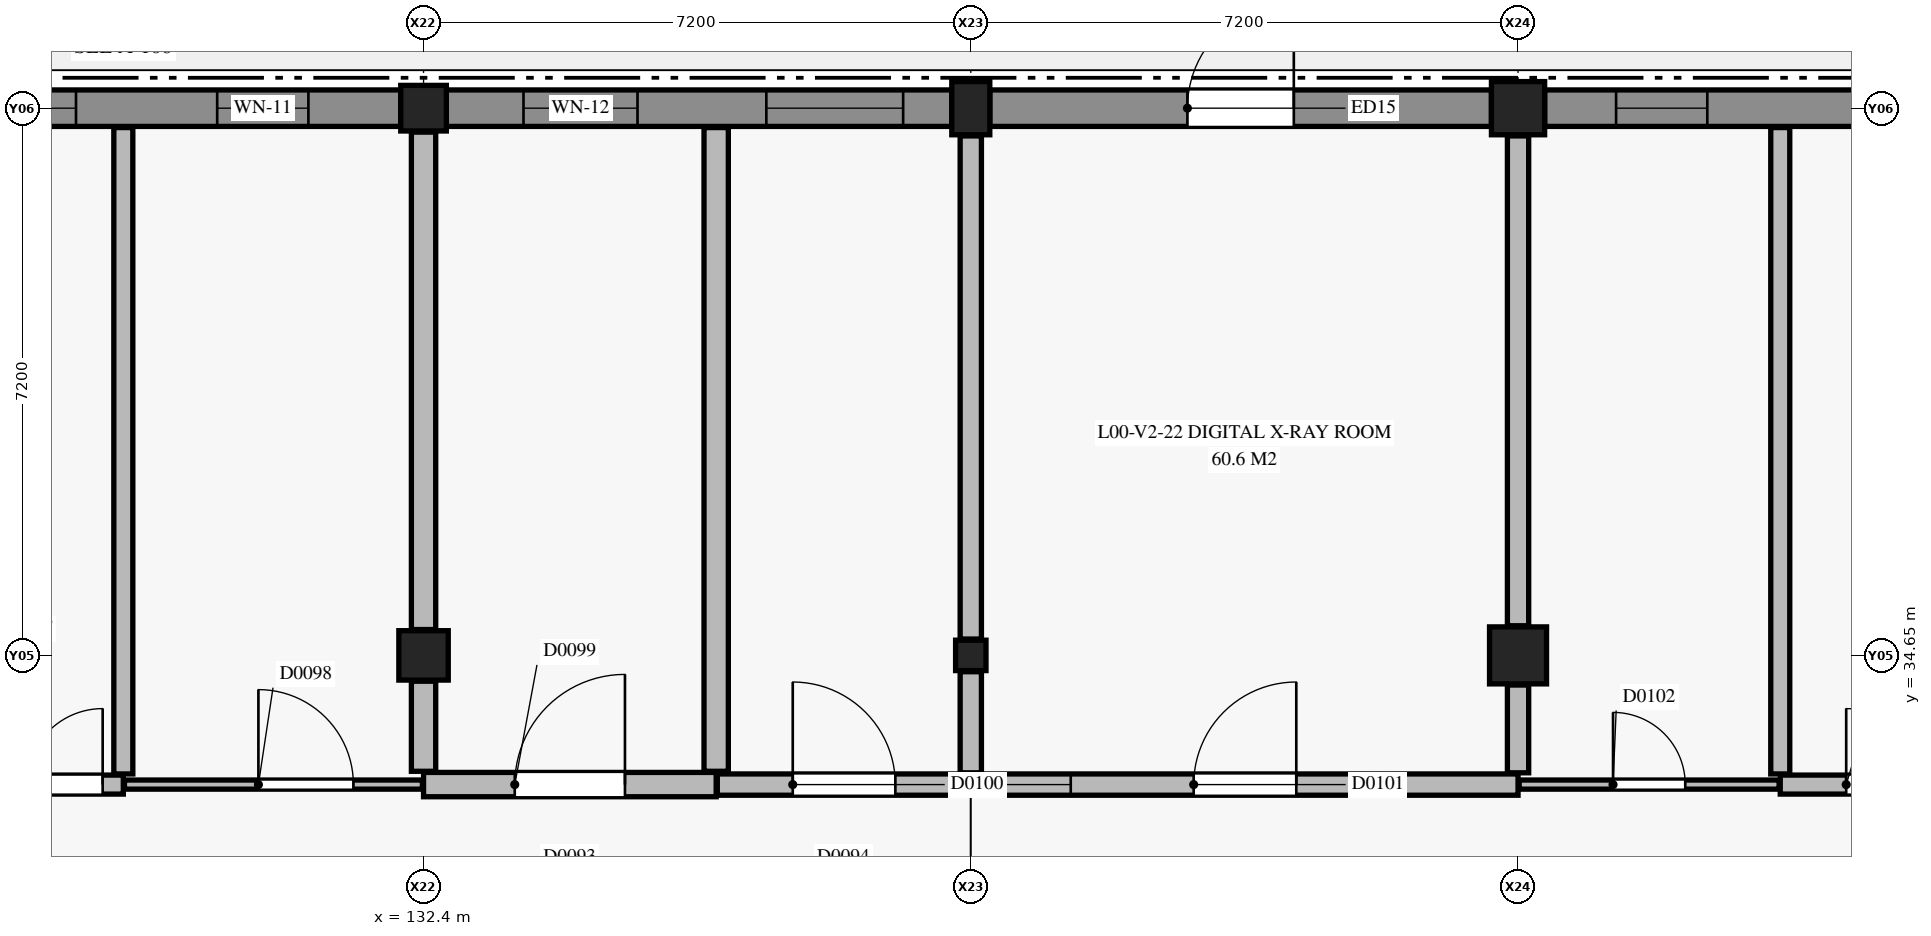
"""IFC4 building model, lengths in metres.
Left out: names, types, materials, properties, quantities, classifications, styles, units other than length and angle.
Written with IfcOpenShell. Run it as: python <this file> out.ifc"""

import sys

from ifc_helpers import new_model, si_unit, direction, frame, frame_2d, origin, origin_2d, place, context, subcontext, project, spatial, rectangle, extrude, element, fill, save


model = new_model("IFC4")
c1 = context("Model", 3, precision=1e-05, world=origin(), true_north=direction((0.0, 1.0)))
c2 = subcontext(c1, "Body", "Model", "MODEL_VIEW")
j1 = project(units=[si_unit("LENGTHUNIT", "METRE"), si_unit("PLANEANGLEUNIT", "RADIAN")], contexts=[c1])
p1 = place(None, origin())
s1 = spatial("IfcSite", under=j1, at=p1, CompositionType="ELEMENT")
p2 = place(p1, origin())
s2 = spatial("IfcBuilding", under=s1, at=p2, CompositionType="ELEMENT")
p3 = place(p2, origin())
s3 = spatial("IfcBuildingStorey", under=s2, at=p3, CompositionType="ELEMENT", Elevation=0.0)
p4 = place(p3, frame((132.4, 34.65, 0.0), z_axis=(0.0, 0.0, 1.0), x_axis=(1.0, 0.0, 0.0)))
e1 = element("IfcColumn", 1, at=p4, inside=s3, PredefinedType="COLUMN", context=c2, shape_type="SweptSolid", body=[
    extrude(rectangle(XDim=0.65, YDim=0.65, at=origin_2d()), origin(), (0.0, 0.0, 1.0), 4.8),
])
p5 = place(p3, frame((132.4, 41.85, 0.0), z_axis=(0.0, 0.0, 1.0), x_axis=(1.0, 0.0, 0.0)))
e2 = element("IfcColumn", 2, at=p5, inside=s3, PredefinedType="COLUMN", context=c2, shape_type="SweptSolid", body=[
    extrude(rectangle(XDim=0.6, YDim=0.6, at=origin_2d()), origin(), (0.0, 0.0, 1.0), 4.8),
])
p6 = place(p3, frame((139.6, 34.65, 0.0), z_axis=(0.0, 0.0, 1.0), x_axis=(1.0, 0.0, 0.0)))
e3 = element("IfcColumn", 3, at=p6, inside=s3, PredefinedType="COLUMN", context=c2, shape_type="SweptSolid", body=[
    extrude(rectangle(XDim=0.4, YDim=0.4, at=origin_2d()), origin(), (0.0, 0.0, 1.0), 4.8),
])
p7 = place(p3, frame((139.6, 41.85, 0.0), z_axis=(0.0, 0.0, 1.0), x_axis=(1.0, 0.0, 0.0)))
e4 = element("IfcColumn", 4, at=p7, inside=s3, PredefinedType="COLUMN", context=c2, shape_type="SweptSolid", body=[
    extrude(rectangle(XDim=0.5, YDim=0.7, at=origin_2d()), origin(), (0.0, 0.0, 1.0), 4.8),
])
p8 = place(p3, frame((146.8, 34.65, 0.0), z_axis=(0.0, 0.0, 1.0), x_axis=(1.0, 0.0, 0.0)))
e5 = element("IfcColumn", 5, at=p8, inside=s3, PredefinedType="COLUMN", context=c2, shape_type="SweptSolid", body=[
    extrude(rectangle(XDim=0.75, YDim=0.75, at=origin_2d()), origin(), (0.0, 0.0, 1.0), 4.8),
])
p9 = place(p3, frame((146.8, 41.85, 0.0), z_axis=(0.0, 0.0, 1.0), x_axis=(1.0, 0.0, 0.0)))
e6 = element("IfcColumn", 6, at=p9, inside=s3, PredefinedType="COLUMN", context=c2, shape_type="SweptSolid", body=[
    extrude(rectangle(XDim=0.7, YDim=0.7, at=origin_2d()), origin(), (0.0, 0.0, 1.0), 4.8),
])
p10 = place(p3, frame((125.425, 41.85, 0.0), z_axis=(0.0, 0.0, 1.0), x_axis=(1.0, 0.0, 0.0)))
e7 = element("IfcWall", 7, at=p10, inside=s3, PredefinedType="SOLIDWALL", context=c2, shape_type="SweptSolid", body=[
    extrude(rectangle(XDim=6.675, YDim=0.48, at=frame_2d((3.337, 0.0))), origin(), (0.0, 0.0, 1.0), 3.64),
])
p11 = place(p10, frame((0.603, 0.0, 0.9)))
e8 = element("IfcOpeningElement", 8, at=p11, cuts=e7, PredefinedType="OPENING", context=c2, shape_type="SweptSolid", body=[
    extrude(rectangle(XDim=1.8, YDim=1.8, at=frame_2d((0.9, 0.9))), frame((0.0, 0.25, 0.0), z_axis=(0.0, -1.0, 0.0), x_axis=(1.0, 0.0, 0.0)), (0.0, 0.0, 1.0), 0.5),
])
p12 = place(p10, frame((4.26, 0.0, 0.9)))
e9 = element("IfcOpeningElement", 9, at=p12, cuts=e7, PredefinedType="OPENING", context=c2, shape_type="SweptSolid", body=[
    extrude(rectangle(XDim=1.2, YDim=1.5, at=frame_2d((0.6, 0.75))), frame((0.0, 0.25, 0.0), z_axis=(0.0, -1.0, 0.0), x_axis=(1.0, 0.0, 0.0)), (0.0, 0.0, 1.0), 0.5),
])
p13 = place(p3, frame((132.7, 41.85, 0.0), z_axis=(0.0, 0.0, 1.0), x_axis=(1.0, 0.0, 0.0)))
e10 = element("IfcWall", 10, at=p13, inside=s3, PredefinedType="SOLIDWALL", context=c2, shape_type="SweptSolid", body=[
    extrude(rectangle(XDim=6.65, YDim=0.48, at=frame_2d((3.325, 0.0))), origin(), (0.0, 0.0, 1.0), 3.64),
])
p14 = place(p13, frame((1.015, 0.0, 0.9)))
e11 = element("IfcOpeningElement", 11, at=p14, cuts=e10, PredefinedType="OPENING", context=c2, shape_type="SweptSolid", body=[
    extrude(rectangle(XDim=1.5, YDim=1.5, at=frame_2d((0.75, 0.75))), frame((0.0, 0.25, 0.0), z_axis=(0.0, -1.0, 0.0), x_axis=(1.0, 0.0, 0.0)), (0.0, 0.0, 1.0), 0.5),
])
p15 = place(p13, frame((4.21, 0.0, 0.9)))
e12 = element("IfcOpeningElement", 12, at=p15, cuts=e10, PredefinedType="OPENING", context=c2, shape_type="SweptSolid", body=[
    extrude(rectangle(XDim=1.8, YDim=1.5, at=frame_2d((0.9, 0.75))), frame((0.0, 0.25, 0.0), z_axis=(0.0, -1.0, 0.0), x_axis=(1.0, 0.0, 0.0)), (0.0, 0.0, 1.0), 0.5),
])
p16 = place(p3, frame((139.85, 41.85, 0.0), z_axis=(0.0, 0.0, 1.0), x_axis=(1.0, 0.0, 0.0)))
e13 = element("IfcWall", 13, at=p16, inside=s3, PredefinedType="SOLIDWALL", context=c2, shape_type="SweptSolid", body=[
    extrude(rectangle(XDim=6.6, YDim=0.48, at=frame_2d((3.3, 0.0))), origin(), (0.0, 0.0, 1.0), 3.64),
])
p17 = place(p16, frame((2.6, 0.0, 0.0)))
e14 = element("IfcOpeningElement", 14, at=p17, cuts=e13, PredefinedType="OPENING", context=c2, shape_type="SweptSolid", body=[
    extrude(rectangle(XDim=1.4, YDim=2.25, at=frame_2d((0.7, 1.125))), frame((0.0, 0.25, 0.0), z_axis=(0.0, -1.0, 0.0), x_axis=(1.0, 0.0, 0.0)), (0.0, 0.0, 1.0), 0.5),
])
p18 = place(p3, frame((147.15, 41.85, 0.0), z_axis=(0.0, 0.0, 1.0), x_axis=(1.0, 0.0, 0.0)))
e15 = element("IfcWall", 15, at=p18, inside=s3, PredefinedType="SOLIDWALL", context=c2, shape_type="SweptSolid", body=[
    extrude(rectangle(XDim=6.625, YDim=0.48, at=frame_2d((3.312, 0.0))), origin(), (0.0, 0.0, 1.0), 3.64),
])
p19 = place(p18, frame((0.94, 0.0, 0.6)))
e16 = element("IfcOpeningElement", 16, at=p19, cuts=e15, PredefinedType="OPENING", context=c2, shape_type="SweptSolid", body=[
    extrude(rectangle(XDim=1.2, YDim=2.2, at=frame_2d((0.6, 1.1))), frame((0.0, 0.25, 0.0), z_axis=(0.0, -1.0, 0.0), x_axis=(1.0, 0.0, 0.0)), (0.0, 0.0, 1.0), 0.5),
])
p20 = place(p18, frame((4.073, 0.0, 0.6)))
e17 = element("IfcOpeningElement", 17, at=p20, cuts=e15, PredefinedType="OPENING", context=c2, shape_type="SweptSolid", body=[
    extrude(rectangle(XDim=1.6, YDim=2.2, at=frame_2d((0.8, 1.1))), frame((0.0, 0.25, 0.0), z_axis=(0.0, -1.0, 0.0), x_axis=(1.0, 0.0, 0.0)), (0.0, 0.0, 1.0), 0.5),
])
p21 = place(p3, frame((132.4, 32.95, 0.0), z_axis=(0.0, 0.0, 1.0), x_axis=(1.0, 0.0, 0.0)))
e18 = element("IfcWall", 18, at=p21, inside=s3, PredefinedType="PARTITIONING", context=c2, shape_type="SweptSolid", body=[
    extrude(rectangle(XDim=3.85, YDim=0.32, at=frame_2d((1.925, 0.0))), origin(), (0.0, 0.0, 1.0), 3.725),
])
p22 = place(p21, frame((1.2, 0.0, 0.0)))
e19 = element("IfcOpeningElement", 19, at=p22, cuts=e18, PredefinedType="OPENING", context=c2, shape_type="SweptSolid", body=[
    extrude(rectangle(XDim=1.45, YDim=2.25, at=frame_2d((0.725, 1.125))), frame((0.0, 0.17, 0.0), z_axis=(0.0, -1.0, 0.0), x_axis=(1.0, 0.0, 0.0)), (0.0, 0.0, 1.0), 0.34),
])
p23 = place(p3, frame((125.215, 32.95, 0.0), z_axis=(0.0, 0.0, 1.0), x_axis=(1.0, 0.0, 0.0)))
e20 = element("IfcWall", 20, at=p23, inside=s3, PredefinedType="PARTITIONING", context=c2, shape_type="SweptSolid", body=[
    extrude(rectangle(XDim=3.235, YDim=0.25, at=frame_2d((1.617, 0.0))), origin(), (0.0, 0.0, 1.0), 3.925),
])
p24 = place(p23, frame((0.963, 0.0, 0.0)))
e21 = element("IfcOpeningElement", 21, at=p24, cuts=e20, PredefinedType="OPENING", context=c2, shape_type="SweptSolid", body=[
    extrude(rectangle(XDim=2.0, YDim=2.4, at=frame_2d((1.0, 1.2))), frame((0.0, 0.135, 0.0), z_axis=(0.0, -1.0, 0.0), x_axis=(1.0, 0.0, 0.0)), (0.0, 0.0, 1.0), 0.27),
])
p25 = place(p3, frame((150.25, 32.95, 0.0), z_axis=(0.0, 0.0, 1.0), x_axis=(1.0, 0.0, 0.0)))
e22 = element("IfcWall", 22, at=p25, inside=s3, PredefinedType="PARTITIONING", context=c2, shape_type="SweptSolid", body=[
    extrude(rectangle(XDim=3.735, YDim=0.25, at=frame_2d((1.868, 0.0))), origin(), (0.0, 0.0, 1.0), 3.795),
])
p26 = place(p25, frame((0.867, 0.0, 0.0)))
e23 = element("IfcOpeningElement", 23, at=p26, cuts=e22, PredefinedType="OPENING", context=c2, shape_type="SweptSolid", body=[
    extrude(rectangle(XDim=2.0, YDim=2.4, at=frame_2d((1.0, 1.2))), frame((0.0, 0.135, 0.0), z_axis=(0.0, -1.0, 0.0), x_axis=(1.0, 0.0, 0.0)), (0.0, 0.0, 1.0), 0.27),
])
p27 = place(p3, frame((136.265, 32.95, 0.0), z_axis=(0.0, 0.0, 1.0), x_axis=(1.0, 0.0, 0.0)))
e24 = element("IfcWall", 24, at=p27, inside=s3, PredefinedType="PARTITIONING", context=c2, shape_type="SweptSolid", body=[
    extrude(rectangle(XDim=3.335, YDim=0.28, at=frame_2d((1.667, 0.0))), origin(), (0.0, 0.0, 1.0), 3.795),
])
p28 = place(p27, frame((0.992, 0.0, 0.0)))
e25 = element("IfcOpeningElement", 25, at=p28, cuts=e24, PredefinedType="OPENING", context=c2, shape_type="SweptSolid", body=[
    extrude(rectangle(XDim=1.35, YDim=2.2, at=frame_2d((0.675, 1.1))), frame((0.0, 0.15, 0.0), z_axis=(0.0, -1.0, 0.0), x_axis=(1.0, 0.0, 0.0)), (0.0, 0.0, 1.0), 0.3),
])
p29 = place(p3, frame((139.615, 32.95, 0.0), z_axis=(0.0, 0.0, 1.0), x_axis=(1.0, 0.0, 0.0)))
e26 = element("IfcWall", 26, at=p29, inside=s3, PredefinedType="PARTITIONING", context=c2, shape_type="SweptSolid", body=[
    extrude(rectangle(XDim=7.185, YDim=0.28, at=frame_2d((3.593, 0.0))), origin(), (0.0, 0.0, 1.0), 3.795),
])
p30 = place(p29, frame((2.917, 0.0, 0.0)))
e27 = element("IfcOpeningElement", 27, at=p30, cuts=e26, PredefinedType="OPENING", context=c2, shape_type="SweptSolid", body=[
    extrude(rectangle(XDim=1.35, YDim=2.2, at=frame_2d((0.675, 1.1))), frame((0.0, 0.15, 0.0), z_axis=(0.0, -1.0, 0.0), x_axis=(1.0, 0.0, 0.0)), (0.0, 0.0, 1.0), 0.3),
])
p31 = place(p29, frame((0.2, 0.0, 1.05)))
e28 = element("IfcOpeningElement", 28, at=p31, cuts=e26, PredefinedType="OPENING", context=c2, shape_type="SweptSolid", body=[
    extrude(rectangle(XDim=1.1, YDim=1.1, at=frame_2d((0.55, 0.55))), frame((0.0, 0.15, 0.0), z_axis=(0.0, -1.0, 0.0), x_axis=(1.0, 0.0, 0.0)), (0.0, 0.0, 1.0), 0.3),
])
p32 = place(p3, frame((128.465, 32.95, 0.0), z_axis=(0.0, 0.0, 1.0), x_axis=(1.0, 0.0, 0.0)))
e29 = element("IfcWall", 29, at=p32, inside=s3, PredefinedType="PARTITIONING", context=c2, shape_type="SweptSolid", body=[
    extrude(rectangle(XDim=3.92, YDim=0.12, at=frame_2d((1.96, 0.0))), origin(), (0.0, 0.0, 1.0), 3.725),
])
p33 = place(p32, frame((1.762, 0.0, 0.0)))
e30 = element("IfcOpeningElement", 30, at=p33, cuts=e29, PredefinedType="OPENING", context=c2, shape_type="SweptSolid", body=[
    extrude(rectangle(XDim=1.25, YDim=2.15, at=frame_2d((0.625, 1.075))), frame((0.0, 0.07, 0.0), z_axis=(0.0, -1.0, 0.0), x_axis=(1.0, 0.0, 0.0)), (0.0, 0.0, 1.0), 0.14),
])
p34 = place(p3, frame((146.815, 32.95, 0.0), z_axis=(0.0, 0.0, 1.0), x_axis=(1.0, 0.0, 0.0)))
e31 = element("IfcWall", 31, at=p34, inside=s3, PredefinedType="PARTITIONING", context=c2, shape_type="SweptSolid", body=[
    extrude(rectangle(XDim=3.42, YDim=0.12, at=frame_2d((1.71, 0.0))), origin(), (0.0, 0.0, 1.0), 3.965),
])
p35 = place(p34, frame((1.235, 0.0, 0.0)))
e32 = element("IfcOpeningElement", 32, at=p35, cuts=e31, PredefinedType="OPENING", context=c2, shape_type="SweptSolid", body=[
    extrude(rectangle(XDim=0.95, YDim=2.1, at=frame_2d((0.475, 1.05))), frame((0.0, 0.07, 0.0), z_axis=(0.0, -1.0, 0.0), x_axis=(1.0, 0.0, 0.0)), (0.0, 0.0, 1.0), 0.14),
])
p36 = place(p3, frame((132.4, 33.125, 0.0), z_axis=(0.0, 0.0, 1.0), x_axis=(0.0, 1.0, 0.0)))
e33 = element("IfcWall", 33, at=p36, inside=s3, PredefinedType="PARTITIONING", context=c2, shape_type="SweptSolid", body=[
    extrude(rectangle(XDim=1.185, YDim=0.32, at=frame_2d((0.593, 0.0))), origin(), (0.0, 0.0, 1.0), 3.725),
])
p37 = place(p3, frame((132.4, 34.99, 0.0), z_axis=(0.0, 0.0, 1.0), x_axis=(0.0, 1.0, 0.0)))
e34 = element("IfcWall", 34, at=p37, inside=s3, PredefinedType="PARTITIONING", context=c2, shape_type="SweptSolid", body=[
    extrude(rectangle(XDim=6.545, YDim=0.32, at=frame_2d((3.272, 0.0))), origin(), (0.0, 0.0, 1.0), 3.795),
])
p38 = place(p3, frame((136.25, 33.125, 0.0), z_axis=(0.0, 0.0, 1.0), x_axis=(0.0, 1.0, 0.0)))
e35 = element("IfcWall", 35, at=p38, inside=s3, PredefinedType="PARTITIONING", context=c2, shape_type="SweptSolid", body=[
    extrude(rectangle(XDim=8.47, YDim=0.32, at=frame_2d((4.235, 0.0))), origin(), (0.0, 0.0, 1.0), 3.795),
])
p39 = place(p3, frame((128.45, 33.09, 0.0), z_axis=(0.0, 0.0, 1.0), x_axis=(0.0, 1.0, 0.0)))
e36 = element("IfcWall", 36, at=p39, inside=s3, PredefinedType="PARTITIONING", context=c2, shape_type="SweptSolid", body=[
    extrude(rectangle(XDim=8.505, YDim=0.25, at=frame_2d((4.252, 0.0))), origin(), (0.0, 0.0, 1.0), 3.725),
])
p40 = place(p3, frame((150.25, 33.09, 0.0), z_axis=(0.0, 0.0, 1.0), x_axis=(0.0, 1.0, 0.0)))
e37 = element("IfcWall", 37, at=p40, inside=s3, PredefinedType="PARTITIONING", context=c2, shape_type="SweptSolid", body=[
    extrude(rectangle(XDim=8.505, YDim=0.25, at=frame_2d((4.252, 0.0))), origin(), (0.0, 0.0, 1.0), 3.925),
])
p41 = place(p3, frame((139.6, 33.105, 0.0), z_axis=(0.0, 0.0, 1.0), x_axis=(0.0, 1.0, 0.0)))
e38 = element("IfcWall", 38, at=p41, inside=s3, PredefinedType="PARTITIONING", context=c2, shape_type="SweptSolid", body=[
    extrude(rectangle(XDim=1.33, YDim=0.28, at=frame_2d((0.665, 0.0))), origin(), (0.0, 0.0, 1.0), 3.795),
])
p42 = place(p3, frame((139.6, 34.865, 0.0), z_axis=(0.0, 0.0, 1.0), x_axis=(0.0, 1.0, 0.0)))
e39 = element("IfcWall", 39, at=p42, inside=s3, PredefinedType="PARTITIONING", context=c2, shape_type="SweptSolid", body=[
    extrude(rectangle(XDim=6.62, YDim=0.28, at=frame_2d((3.31, 0.0))), origin(), (0.0, 0.0, 1.0), 3.925),
])
p43 = place(p3, frame((146.8, 33.105, 0.0), z_axis=(0.0, 0.0, 1.0), x_axis=(0.0, 1.0, 0.0)))
e40 = element("IfcWall", 40, at=p43, inside=s3, PredefinedType="PARTITIONING", context=c2, shape_type="SweptSolid", body=[
    extrude(rectangle(XDim=1.155, YDim=0.28, at=frame_2d((0.578, 0.0))), origin(), (0.0, 0.0, 1.0), 3.965),
])
p44 = place(p3, frame((146.8, 35.04, 0.0), z_axis=(0.0, 0.0, 1.0), x_axis=(0.0, 1.0, 0.0)))
e41 = element("IfcWall", 41, at=p44, inside=s3, PredefinedType="PARTITIONING", context=c2, shape_type="SweptSolid", body=[
    extrude(rectangle(XDim=6.445, YDim=0.28, at=frame_2d((3.223, 0.0))), origin(), (0.0, 0.0, 1.0), 3.725),
])
p45 = place(p11, origin())
e42 = element("IfcWindow", 42, at=p45, inside=s3, PartitioningType="SINGLE_PANEL", PredefinedType="WINDOW", context=c2, shape_type="SweptSolid", body=[
    extrude(rectangle(XDim=1.8, YDim=1.8, at=frame_2d((0.9, 0.9))), frame((0.0, 0.03, 0.0), z_axis=(0.0, -1.0, 0.0), x_axis=(1.0, 0.0, 0.0)), (0.0, 0.0, 1.0), 0.06),
])
fill(e8, e42)
p46 = place(p12, origin())
e43 = element("IfcWindow", 43, at=p46, inside=s3, PartitioningType="SINGLE_PANEL", PredefinedType="WINDOW", context=c2, shape_type="SweptSolid", body=[
    extrude(rectangle(XDim=1.2, YDim=1.5, at=frame_2d((0.6, 0.75))), frame((0.0, 0.03, 0.0), z_axis=(0.0, -1.0, 0.0), x_axis=(1.0, 0.0, 0.0)), (0.0, 0.0, 1.0), 0.06),
])
fill(e9, e43)
p47 = place(p14, origin())
e44 = element("IfcWindow", 44, at=p47, inside=s3, PartitioningType="SINGLE_PANEL", PredefinedType="WINDOW", context=c2, shape_type="SweptSolid", body=[
    extrude(rectangle(XDim=1.5, YDim=1.5, at=frame_2d((0.75, 0.75))), frame((0.0, 0.03, 0.0), z_axis=(0.0, -1.0, 0.0), x_axis=(1.0, 0.0, 0.0)), (0.0, 0.0, 1.0), 0.06),
])
fill(e11, e44)
p48 = place(p15, origin())
e45 = element("IfcWindow", 45, at=p48, inside=s3, PartitioningType="SINGLE_PANEL", PredefinedType="WINDOW", context=c2, shape_type="SweptSolid", body=[
    extrude(rectangle(XDim=1.8, YDim=1.5, at=frame_2d((0.9, 0.75))), frame((0.0, 0.03, 0.0), z_axis=(0.0, -1.0, 0.0), x_axis=(1.0, 0.0, 0.0)), (0.0, 0.0, 1.0), 0.06),
])
fill(e12, e45)
p49 = place(p17, origin())
e46 = element("IfcDoor", 46, at=p49, inside=s3, OperationType="SINGLE_SWING_RIGHT", PredefinedType="DOOR", context=c2, shape_type="SweptSolid", body=[
    extrude(rectangle(XDim=1.4, YDim=2.25, at=frame_2d((0.7, 1.125))), frame((0.0, 0.025, 0.0), z_axis=(0.0, -1.0, 0.0), x_axis=(1.0, 0.0, 0.0)), (0.0, 0.0, 1.0), 0.05),
])
fill(e14, e46)
p50 = place(p19, origin())
e47 = element("IfcWindow", 47, at=p50, inside=s3, PartitioningType="SINGLE_PANEL", PredefinedType="WINDOW", context=c2, shape_type="SweptSolid", body=[
    extrude(rectangle(XDim=1.2, YDim=2.2, at=frame_2d((0.6, 1.1))), frame((0.0, 0.03, 0.0), z_axis=(0.0, -1.0, 0.0), x_axis=(1.0, 0.0, 0.0)), (0.0, 0.0, 1.0), 0.06),
])
fill(e16, e47)
p51 = place(p24, origin())
e48 = element("IfcDoor", 48, at=p51, inside=s3, OperationType="DOUBLE_DOOR_SINGLE_SWING", PredefinedType="DOOR", context=c2, shape_type="SweptSolid", body=[
    extrude(rectangle(XDim=2.0, YDim=2.4, at=frame_2d((1.0, 1.2))), frame((0.0, 0.025, 0.0), z_axis=(0.0, -1.0, 0.0), x_axis=(1.0, 0.0, 0.0)), (0.0, 0.0, 1.0), 0.05),
])
fill(e21, e48)
p52 = place(p33, origin())
e49 = element("IfcDoor", 49, at=p52, inside=s3, OperationType="SINGLE_SWING_LEFT", PredefinedType="DOOR", context=c2, shape_type="SweptSolid", body=[
    extrude(rectangle(XDim=1.25, YDim=2.15, at=frame_2d((0.625, 1.075))), frame((0.0, 0.025, 0.0), z_axis=(0.0, -1.0, 0.0), x_axis=(1.0, 0.0, 0.0)), (0.0, 0.0, 1.0), 0.05),
])
fill(e30, e49)
p53 = place(p22, origin())
e50 = element("IfcDoor", 50, at=p53, inside=s3, OperationType="SINGLE_SWING_RIGHT", PredefinedType="DOOR", context=c2, shape_type="SweptSolid", body=[
    extrude(rectangle(XDim=1.45, YDim=2.25, at=frame_2d((0.725, 1.125))), frame((0.0, 0.025, 0.0), z_axis=(0.0, -1.0, 0.0), x_axis=(1.0, 0.0, 0.0)), (0.0, 0.0, 1.0), 0.05),
])
fill(e19, e50)
p54 = place(p28, origin())
e51 = element("IfcDoor", 51, at=p54, inside=s3, OperationType="SINGLE_SWING_LEFT", PredefinedType="DOOR", context=c2, shape_type="SweptSolid", body=[
    extrude(rectangle(XDim=1.35, YDim=2.2, at=frame_2d((0.675, 1.1))), frame((0.0, 0.025, 0.0), z_axis=(0.0, -1.0, 0.0), x_axis=(1.0, 0.0, 0.0)), (0.0, 0.0, 1.0), 0.05),
])
fill(e25, e51)
p55 = place(p30, origin())
e52 = element("IfcDoor", 52, at=p55, inside=s3, OperationType="SINGLE_SWING_RIGHT", PredefinedType="DOOR", context=c2, shape_type="SweptSolid", body=[
    extrude(rectangle(XDim=1.35, YDim=2.2, at=frame_2d((0.675, 1.1))), frame((0.0, 0.025, 0.0), z_axis=(0.0, -1.0, 0.0), x_axis=(1.0, 0.0, 0.0)), (0.0, 0.0, 1.0), 0.05),
])
fill(e27, e52)
p56 = place(p31, origin())
e53 = element("IfcWindow", 53, at=p56, inside=s3, PartitioningType="SINGLE_PANEL", PredefinedType="WINDOW", context=c2, shape_type="SweptSolid", body=[
    extrude(rectangle(XDim=1.1, YDim=1.1, at=frame_2d((0.55, 0.55))), frame((0.0, 0.03, 0.0), z_axis=(0.0, -1.0, 0.0), x_axis=(1.0, 0.0, 0.0)), (0.0, 0.0, 1.0), 0.06),
])
fill(e28, e53)
p57 = place(p35, origin())
e54 = element("IfcDoor", 54, at=p57, inside=s3, OperationType="SINGLE_SWING_LEFT", PredefinedType="DOOR", context=c2, shape_type="SweptSolid", body=[
    extrude(rectangle(XDim=0.95, YDim=2.1, at=frame_2d((0.475, 1.05))), frame((0.0, 0.025, 0.0), z_axis=(0.0, -1.0, 0.0), x_axis=(1.0, 0.0, 0.0)), (0.0, 0.0, 1.0), 0.05),
])
fill(e32, e54)
p58 = place(p26, origin())
e55 = element("IfcDoor", 55, at=p58, inside=s3, OperationType="DOUBLE_DOOR_SINGLE_SWING", PredefinedType="DOOR", context=c2, shape_type="SweptSolid", body=[
    extrude(rectangle(XDim=2.0, YDim=2.4, at=frame_2d((1.0, 1.2))), frame((0.0, 0.025, 0.0), z_axis=(0.0, -1.0, 0.0), x_axis=(1.0, 0.0, 0.0)), (0.0, 0.0, 1.0), 0.05),
])
fill(e23, e55)
save(model, sys.argv[1])
